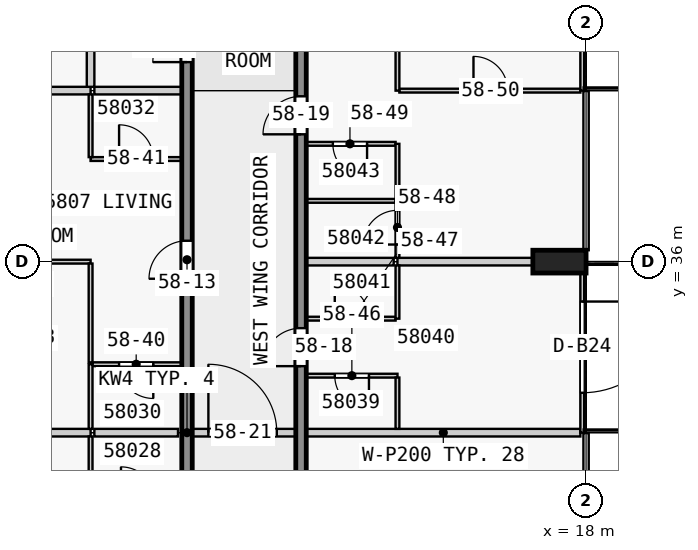
"""IFC4 building model, lengths in metres.
Left out: names, types, materials, properties, quantities, classifications, styles, units other than length and angle.
Written with IfcOpenShell. Run it as: python <this file> out.ifc"""

import sys

from ifc_helpers import new_model, si_unit, direction, frame, frame_2d, origin, origin_2d, place, context, subcontext, project, spatial, rectangle, extrude, element, fill, save


model = new_model("IFC4")
c1 = context("Model", 3, precision=1e-05, world=origin(), true_north=direction((0.0, 1.0)))
c2 = subcontext(c1, "Body", "Model", "MODEL_VIEW")
j1 = project(units=[si_unit("LENGTHUNIT", "METRE"), si_unit("PLANEANGLEUNIT", "RADIAN")], contexts=[c1])
p1 = place(None, origin())
s1 = spatial("IfcSite", under=j1, at=p1, CompositionType="ELEMENT")
p2 = place(p1, origin())
s2 = spatial("IfcBuilding", under=s1, at=p2, CompositionType="ELEMENT")
p3 = place(p2, frame((0.0, 0.0, 222.4)))
s3 = spatial("IfcBuildingStorey", under=s2, at=p3, CompositionType="ELEMENT", Elevation=222.4)
p4 = place(p3, frame((17.3, 36.0, 0.0), z_axis=(0.0, 0.0, 1.0), x_axis=(0.0, 1.0, 0.0)))
e1 = element("IfcColumn", 1, at=p4, inside=s3, PredefinedType="COLUMN", context=c2, shape_type="SweptSolid", body=[
    extrude(rectangle(XDim=0.6, YDim=1.4, at=origin_2d()), origin(), (0.0, 0.0, 1.0), 3.5),
])
p5 = place(p3, frame((7.5, 18.0, 0.0), z_axis=(0.0, 0.0, 1.0), x_axis=(0.0, 1.0, 0.0)))
e2 = element("IfcWall", 2, at=p5, inside=s3, PredefinedType="SHEAR", context=c2, shape_type="SweptSolid", body=[
    extrude(rectangle(XDim=27.0, YDim=0.275, at=frame_2d((13.5, 0.0))), origin(), (0.0, 0.0, 1.0), 3.25),
])
p6 = place(p5, frame((1.75, 0.0, 0.0)))
e3 = element("IfcOpeningElement", 3, at=p6, cuts=e2, PredefinedType="OPENING", context=c2, shape_type="SweptSolid", body=[
    extrude(rectangle(XDim=1.0, YDim=2.1, at=frame_2d((0.5, 1.05))), frame((0.0, 0.147, 0.0), z_axis=(0.0, -1.0, 0.0), x_axis=(1.0, 0.0, 0.0)), (0.0, 0.0, 1.0), 0.295),
])
p7 = place(p5, frame((8.55, 0.0, 0.0)))
e4 = element("IfcOpeningElement", 4, at=p7, cuts=e2, PredefinedType="OPENING", context=c2, shape_type="SweptSolid", body=[
    extrude(rectangle(XDim=1.0, YDim=2.1, at=frame_2d((0.5, 1.05))), frame((0.0, 0.147, 0.0), z_axis=(0.0, -1.0, 0.0), x_axis=(1.0, 0.0, 0.0)), (0.0, 0.0, 1.0), 0.295),
])
p8 = place(p5, frame((17.55, 0.0, 0.0)))
e5 = element("IfcOpeningElement", 5, at=p8, cuts=e2, PredefinedType="OPENING", context=c2, shape_type="SweptSolid", body=[
    extrude(rectangle(XDim=1.0, YDim=2.1, at=frame_2d((0.5, 1.05))), frame((0.0, 0.147, 0.0), z_axis=(0.0, -1.0, 0.0), x_axis=(1.0, 0.0, 0.0)), (0.0, 0.0, 1.0), 0.295),
])
p9 = place(p5, frame((23.25, 0.0, 0.0)))
e6 = element("IfcOpeningElement", 6, at=p9, cuts=e2, PredefinedType="OPENING", context=c2, shape_type="SweptSolid", body=[
    extrude(rectangle(XDim=0.9, YDim=2.1, at=frame_2d((0.45, 1.05))), frame((0.0, 0.147, 0.0), z_axis=(0.0, -1.0, 0.0), x_axis=(1.0, 0.0, 0.0)), (0.0, 0.0, 1.0), 0.295),
])
p10 = place(p5, frame((25.45, 0.0, 0.0)))
e7 = element("IfcOpeningElement", 7, at=p10, cuts=e2, PredefinedType="OPENING", context=c2, shape_type="SweptSolid", body=[
    extrude(rectangle(XDim=1.0, YDim=2.1, at=frame_2d((0.5, 1.05))), frame((0.0, 0.147, 0.0), z_axis=(0.0, -1.0, 0.0), x_axis=(1.0, 0.0, 0.0)), (0.0, 0.0, 1.0), 0.295),
])
p11 = place(p3, frame((10.5, 18.0, 0.0), z_axis=(0.0, 0.0, 1.0), x_axis=(0.0, 1.0, 0.0)))
e8 = element("IfcWall", 8, at=p11, inside=s3, PredefinedType="SHEAR", context=c2, shape_type="SweptSolid", body=[
    extrude(rectangle(XDim=27.0, YDim=0.275, at=frame_2d((13.5, 0.0))), origin(), (0.0, 0.0, 1.0), 3.25),
])
p12 = place(p11, frame((4.05, 0.0, 0.0)))
e9 = element("IfcOpeningElement", 9, at=p12, cuts=e8, PredefinedType="OPENING", context=c2, shape_type="SweptSolid", body=[
    extrude(rectangle(XDim=1.0, YDim=2.1, at=frame_2d((0.5, 1.05))), frame((0.0, 0.147, 0.0), z_axis=(0.0, -1.0, 0.0), x_axis=(1.0, 0.0, 0.0)), (0.0, 0.0, 1.0), 0.295),
])
p13 = place(p11, frame((10.35, 0.0, 0.0)))
e10 = element("IfcOpeningElement", 10, at=p13, cuts=e8, PredefinedType="OPENING", context=c2, shape_type="SweptSolid", body=[
    extrude(rectangle(XDim=1.8, YDim=2.1, at=frame_2d((0.9, 1.05))), frame((0.0, 0.147, 0.0), z_axis=(0.0, -1.0, 0.0), x_axis=(1.0, 0.0, 0.0)), (0.0, 0.0, 1.0), 0.295),
])
p14 = place(p11, frame((15.25, 0.0, 0.0)))
e11 = element("IfcOpeningElement", 11, at=p14, cuts=e8, PredefinedType="OPENING", context=c2, shape_type="SweptSolid", body=[
    extrude(rectangle(XDim=1.0, YDim=2.1, at=frame_2d((0.5, 1.05))), frame((0.0, 0.147, 0.0), z_axis=(0.0, -1.0, 0.0), x_axis=(1.0, 0.0, 0.0)), (0.0, 0.0, 1.0), 0.295),
])
p15 = place(p11, frame((21.35, 0.0, 0.0)))
e12 = element("IfcOpeningElement", 12, at=p15, cuts=e8, PredefinedType="OPENING", context=c2, shape_type="SweptSolid", body=[
    extrude(rectangle(XDim=1.0, YDim=2.1, at=frame_2d((0.5, 1.05))), frame((0.0, 0.147, 0.0), z_axis=(0.0, -1.0, 0.0), x_axis=(1.0, 0.0, 0.0)), (0.0, 0.0, 1.0), 0.295),
])
p16 = place(p3, frame((17.9, 36.0, 0.0), z_axis=(0.0, 0.0, 1.0), x_axis=(0.0, -1.0, 0.0)))
e13 = element("IfcWall", 13, at=p16, inside=s3, PredefinedType="STANDARD", context=c2, shape_type="SweptSolid", body=[
    extrude(rectangle(XDim=4.5, YDim=0.1, at=frame_2d((2.25, 0.0))), origin(), (0.0, 0.0, 1.0), 3.25),
])
p17 = place(p16, frame((1.05, 0.0, 0.0)))
e14 = element("IfcOpeningElement", 14, at=p17, cuts=e13, PredefinedType="OPENING", context=c2, shape_type="SweptSolid", body=[
    extrude(rectangle(XDim=2.4, YDim=2.4, at=frame_2d((1.2, 1.2))), frame((0.0, 0.06, 0.0), z_axis=(0.0, -1.0, 0.0), x_axis=(1.0, 0.0, 0.0)), (0.0, 0.0, 1.0), 0.12),
])
p18 = place(p3, frame((17.9, 45.0, 0.0), z_axis=(0.0, 0.0, 1.0), x_axis=(0.0, -1.0, 0.0)))
e15 = element("IfcWall", 15, at=p18, inside=s3, PredefinedType="STANDARD", context=c2, shape_type="SweptSolid", body=[
    extrude(rectangle(XDim=4.5, YDim=0.1, at=frame_2d((2.25, 0.0))), origin(), (0.0, 0.0, 1.0), 3.25),
])
p19 = place(p18, frame((1.05, 0.0, 0.0)))
e16 = element("IfcOpeningElement", 16, at=p19, cuts=e15, PredefinedType="OPENING", context=c2, shape_type="SweptSolid", body=[
    extrude(rectangle(XDim=2.4, YDim=2.4, at=frame_2d((1.2, 1.2))), frame((0.0, 0.06, 0.0), z_axis=(0.0, -1.0, 0.0), x_axis=(1.0, 0.0, 0.0)), (0.0, 0.0, 1.0), 0.12),
])
p20 = place(p3, frame((7.262, 31.5, 0.0), z_axis=(0.0, 0.0, 1.0), x_axis=(-1.0, 0.0, 0.0)))
e17 = element("IfcWall", 17, at=p20, inside=s3, PredefinedType="PARTITIONING", context=c2, shape_type="SweptSolid", body=[
    extrude(rectangle(XDim=2.2, YDim=0.2, at=frame_2d((1.1, 0.0))), origin(), (0.0, 0.0, 1.0), 3.25),
])
p21 = place(p3, frame((17.85, 31.5, 0.0), z_axis=(0.0, 0.0, 1.0), x_axis=(-1.0, 0.0, 0.0)))
e18 = element("IfcWall", 18, at=p21, inside=s3, PredefinedType="PARTITIONING", context=c2, shape_type="SweptSolid", body=[
    extrude(rectangle(XDim=7.213, YDim=0.2, at=frame_2d((3.606, 0.0))), origin(), (0.0, 0.0, 1.0), 3.25),
])
p22 = place(p3, frame((0.15, 31.5, 0.0), z_axis=(0.0, 0.0, 1.0), x_axis=(1.0, 0.0, 0.0)))
e19 = element("IfcWall", 19, at=p22, inside=s3, PredefinedType="PARTITIONING", context=c2, shape_type="SweptSolid", body=[
    extrude(rectangle(XDim=4.812, YDim=0.2, at=frame_2d((2.406, 0.0))), origin(), (0.0, 0.0, 1.0), 3.25),
])
p23 = place(p3, frame((13.038, 33.0, 0.0), z_axis=(0.0, 0.0, 1.0), x_axis=(-1.0, 0.0, 0.0)))
e20 = element("IfcWall", 20, at=p23, inside=s3, PredefinedType="PARTITIONING", context=c2, shape_type="SweptSolid", body=[
    extrude(rectangle(XDim=2.4, YDim=0.1, at=frame_2d((1.2, 0.0))), origin(), (0.0, 0.0, 1.0), 3.25),
])
p24 = place(p23, frame((0.75, 0.0, 0.0)))
e21 = element("IfcOpeningElement", 21, at=p24, cuts=e20, PredefinedType="OPENING", context=c2, shape_type="SweptSolid", body=[
    extrude(rectangle(XDim=0.9, YDim=2.1, at=frame_2d((0.45, 1.05))), frame((0.0, 0.06, 0.0), z_axis=(0.0, -1.0, 0.0), x_axis=(1.0, 0.0, 0.0)), (0.0, 0.0, 1.0), 0.12),
])
p25 = place(p3, frame((7.363, 33.3, 0.0), z_axis=(0.0, 0.0, 1.0), x_axis=(-1.0, 0.0, 0.0)))
e22 = element("IfcWall", 22, at=p25, inside=s3, PredefinedType="PARTITIONING", context=c2, shape_type="SweptSolid", body=[
    extrude(rectangle(XDim=2.35, YDim=0.1, at=frame_2d((1.175, 0.0))), origin(), (0.0, 0.0, 1.0), 3.25),
])
p26 = place(p25, frame((0.75, 0.0, 0.0)))
e23 = element("IfcOpeningElement", 23, at=p26, cuts=e22, PredefinedType="OPENING", context=c2, shape_type="SweptSolid", body=[
    extrude(rectangle(XDim=0.9, YDim=2.1, at=frame_2d((0.45, 1.05))), frame((0.0, 0.06, 0.0), z_axis=(0.0, -1.0, 0.0), x_axis=(1.0, 0.0, 0.0)), (0.0, 0.0, 1.0), 0.12),
])
p27 = place(p3, frame((10.637, 34.5, 0.0), z_axis=(0.0, 0.0, 1.0), x_axis=(1.0, 0.0, 0.0)))
e24 = element("IfcWall", 24, at=p27, inside=s3, PredefinedType="PARTITIONING", context=c2, shape_type="SweptSolid", body=[
    extrude(rectangle(XDim=2.35, YDim=0.1, at=frame_2d((1.175, 0.0))), origin(), (0.0, 0.0, 1.0), 3.25),
])
p28 = place(p27, frame((0.75, 0.0, 0.0)))
e25 = element("IfcOpeningElement", 25, at=p28, cuts=e24, PredefinedType="OPENING", context=c2, shape_type="SweptSolid", body=[
    extrude(rectangle(XDim=0.9, YDim=2.1, at=frame_2d((0.45, 1.05))), frame((0.0, 0.06, 0.0), z_axis=(0.0, -1.0, 0.0), x_axis=(1.0, 0.0, 0.0)), (0.0, 0.0, 1.0), 0.12),
])
p29 = place(p3, frame((4.962, 36.0, 0.0), z_axis=(0.0, 0.0, 1.0), x_axis=(-1.0, 0.0, 0.0)))
e26 = element("IfcWall", 26, at=p29, inside=s3, PredefinedType="PARTITIONING", context=c2, shape_type="SweptSolid", body=[
    extrude(rectangle(XDim=3.562, YDim=0.1, at=frame_2d((1.781, 0.0))), origin(), (0.0, 0.0, 1.0), 3.25),
])
p30 = place(p29, frame((1.35, 0.0, 0.0)))
e27 = element("IfcOpeningElement", 27, at=p30, cuts=e26, PredefinedType="OPENING", context=c2, shape_type="SweptSolid", body=[
    extrude(rectangle(XDim=0.9, YDim=2.1, at=frame_2d((0.45, 1.05))), frame((0.0, 0.06, 0.0), z_axis=(0.0, -1.0, 0.0), x_axis=(1.0, 0.0, 0.0)), (0.0, 0.0, 1.0), 0.12),
])
p31 = place(p3, frame((12.938, 36.0, 0.0), z_axis=(0.0, 0.0, 1.0), x_axis=(-1.0, 0.0, 0.0)))
e28 = element("IfcWall", 28, at=p31, inside=s3, PredefinedType="PARTITIONING", context=c2, shape_type="SweptSolid", body=[
    extrude(rectangle(XDim=2.3, YDim=0.2, at=frame_2d((1.15, 0.0))), origin(), (0.0, 0.0, 1.0), 3.25),
])
p32 = place(p3, frame((13.038, 36.0, 0.0), z_axis=(0.0, 0.0, 1.0), x_axis=(1.0, 0.0, 0.0)))
e29 = element("IfcWall", 29, at=p32, inside=s3, PredefinedType="PARTITIONING", context=c2, shape_type="SweptSolid", body=[
    extrude(rectangle(XDim=3.562, YDim=0.2, at=frame_2d((1.781, 0.0))), origin(), (0.0, 0.0, 1.0), 3.25),
])
p33 = place(p3, frame((12.988, 37.6, 0.0), z_axis=(0.0, 0.0, 1.0), x_axis=(-1.0, 0.0, 0.0)))
e30 = element("IfcWall", 30, at=p33, inside=s3, PredefinedType="PARTITIONING", context=c2, shape_type="SweptSolid", body=[
    extrude(rectangle(XDim=2.35, YDim=0.1, at=frame_2d((1.175, 0.0))), origin(), (0.0, 0.0, 1.0), 3.25),
])
p34 = place(p3, frame((4.962, 38.7, 0.0), z_axis=(0.0, 0.0, 1.0), x_axis=(1.0, 0.0, 0.0)))
e31 = element("IfcWall", 31, at=p34, inside=s3, PredefinedType="PARTITIONING", context=c2, shape_type="SweptSolid", body=[
    extrude(rectangle(XDim=2.4, YDim=0.1, at=frame_2d((1.2, 0.0))), origin(), (0.0, 0.0, 1.0), 3.25),
])
p35 = place(p34, frame((0.75, 0.0, 0.0)))
e32 = element("IfcOpeningElement", 32, at=p35, cuts=e31, PredefinedType="OPENING", context=c2, shape_type="SweptSolid", body=[
    extrude(rectangle(XDim=0.9, YDim=2.1, at=frame_2d((0.45, 1.05))), frame((0.0, 0.06, 0.0), z_axis=(0.0, -1.0, 0.0), x_axis=(1.0, 0.0, 0.0)), (0.0, 0.0, 1.0), 0.12),
])
p36 = place(p3, frame((12.988, 39.1, 0.0), z_axis=(0.0, 0.0, 1.0), x_axis=(-1.0, 0.0, 0.0)))
e33 = element("IfcWall", 33, at=p36, inside=s3, PredefinedType="PARTITIONING", context=c2, shape_type="SweptSolid", body=[
    extrude(rectangle(XDim=2.35, YDim=0.1, at=frame_2d((1.175, 0.0))), origin(), (0.0, 0.0, 1.0), 3.25),
])
p37 = place(p36, frame((0.75, 0.0, 0.0)))
e34 = element("IfcOpeningElement", 34, at=p37, cuts=e33, PredefinedType="OPENING", context=c2, shape_type="SweptSolid", body=[
    extrude(rectangle(XDim=0.9, YDim=2.1, at=frame_2d((0.45, 1.05))), frame((0.0, 0.06, 0.0), z_axis=(0.0, -1.0, 0.0), x_axis=(1.0, 0.0, 0.0)), (0.0, 0.0, 1.0), 0.12),
])
p38 = place(p3, frame((13.087, 40.5, 0.0), z_axis=(0.0, 0.0, 1.0), x_axis=(1.0, 0.0, 0.0)))
e35 = element("IfcWall", 35, at=p38, inside=s3, PredefinedType="PARTITIONING", context=c2, shape_type="SweptSolid", body=[
    extrude(rectangle(XDim=4.763, YDim=0.1, at=frame_2d((2.381, 0.0))), origin(), (0.0, 0.0, 1.0), 3.25),
])
p39 = place(p38, frame((1.95, 0.0, 0.0)))
e36 = element("IfcOpeningElement", 36, at=p39, cuts=e35, PredefinedType="OPENING", context=c2, shape_type="SweptSolid", body=[
    extrude(rectangle(XDim=0.9, YDim=2.1, at=frame_2d((0.45, 1.05))), frame((0.0, 0.06, 0.0), z_axis=(0.0, -1.0, 0.0), x_axis=(1.0, 0.0, 0.0)), (0.0, 0.0, 1.0), 0.12),
])
p40 = place(p3, frame((7.363, 40.5, 0.0), z_axis=(0.0, 0.0, 1.0), x_axis=(-1.0, 0.0, 0.0)))
e37 = element("IfcWall", 37, at=p40, inside=s3, PredefinedType="PARTITIONING", context=c2, shape_type="SweptSolid", body=[
    extrude(rectangle(XDim=2.3, YDim=0.2, at=frame_2d((1.15, 0.0))), origin(), (0.0, 0.0, 1.0), 3.25),
])
p41 = place(p3, frame((-0.08, 40.5, 0.0), z_axis=(0.0, 0.0, 1.0), x_axis=(1.0, 0.0, 0.0)))
e38 = element("IfcWall", 38, at=p41, inside=s3, PredefinedType="PARTITIONING", context=c2, shape_type="SweptSolid", body=[
    extrude(rectangle(XDim=5.042, YDim=0.2, at=frame_2d((2.521, 0.0))), origin(), (0.0, 0.0, 1.0), 3.25),
])
for number, where, z_axis, x_axis in (
    (39, (4.962, 31.4, 0.0), (0.0, 0.0, 1.0), (0.0, -1.0, 0.0)),
    (40, (4.962, 33.3, 0.0), (0.0, 0.0, 1.0), (0.0, -1.0, 0.0)),
):
    element("IfcWall", number, at=place(p3, frame(where, z_axis=z_axis, x_axis=x_axis)), inside=s3, PredefinedType="PARTITIONING", context=c2, shape_type="SweptSolid", body=[
        extrude(rectangle(XDim=1.7, YDim=0.1, at=frame_2d((0.85, 0.0))), origin(), (0.0, 0.0, 1.0), 3.25),
    ])
p42 = place(p3, frame((4.962, 40.4, 0.0), z_axis=(0.0, 0.0, 1.0), x_axis=(0.0, -1.0, 0.0)))
e41 = element("IfcWall", 41, at=p42, inside=s3, PredefinedType="PARTITIONING", context=c2, shape_type="SweptSolid", body=[
    extrude(rectangle(XDim=1.65, YDim=0.1, at=frame_2d((0.825, 0.0))), origin(), (0.0, 0.0, 1.0), 3.25),
])
p43 = place(p3, frame((4.962, 33.35, 0.0), z_axis=(0.0, 0.0, 1.0), x_axis=(0.0, 1.0, 0.0)))
e42 = element("IfcWall", 42, at=p43, inside=s3, PredefinedType="PARTITIONING", context=c2, shape_type="SweptSolid", body=[
    extrude(rectangle(XDim=2.6, YDim=0.1, at=frame_2d((1.3, 0.0))), origin(), (0.0, 0.0, 1.0), 3.25),
])
p44 = place(p3, frame((4.962, 42.8, 0.0), z_axis=(0.0, 0.0, 1.0), x_axis=(0.0, -1.0, 0.0)))
e43 = element("IfcWall", 43, at=p44, inside=s3, PredefinedType="PARTITIONING", context=c2, shape_type="SweptSolid", body=[
    extrude(rectangle(XDim=2.2, YDim=0.2, at=frame_2d((1.1, 0.0))), origin(), (0.0, 0.0, 1.0), 3.25),
])
p45 = place(p3, frame((13.038, 54.08, 0.0), z_axis=(0.0, 0.0, 1.0), x_axis=(0.0, -1.0, 0.0)))
e44 = element("IfcWall", 44, at=p45, inside=s3, PredefinedType="PARTITIONING", context=c2, shape_type="SweptSolid", body=[
    extrude(rectangle(XDim=13.58, YDim=0.1, at=frame_2d((6.79, 0.0))), origin(), (0.0, 0.0, 1.0), 3.25),
])
p46 = place(p45, frame((6.45, 0.0, 0.0)))
e45 = element("IfcOpeningElement", 45, at=p46, cuts=e44, PredefinedType="OPENING", context=c2, shape_type="SweptSolid", body=[
    extrude(rectangle(XDim=0.9, YDim=2.1, at=frame_2d((0.45, 1.05))), frame((0.0, 0.06, 0.0), z_axis=(0.0, -1.0, 0.0), x_axis=(1.0, 0.0, 0.0)), (0.0, 0.0, 1.0), 0.12),
])
p47 = place(p45, frame((1.95, 0.0, 0.0)))
e46 = element("IfcOpeningElement", 46, at=p47, cuts=e44, PredefinedType="OPENING", context=c2, shape_type="SweptSolid", body=[
    extrude(rectangle(XDim=0.9, YDim=2.1, at=frame_2d((0.45, 1.05))), frame((0.0, 0.06, 0.0), z_axis=(0.0, -1.0, 0.0), x_axis=(1.0, 0.0, 0.0)), (0.0, 0.0, 1.0), 0.12),
])
p48 = place(p3, frame((13.038, 31.6, 0.0), z_axis=(0.0, 0.0, 1.0), x_axis=(0.0, 1.0, 0.0)))
e47 = element("IfcWall", 47, at=p48, inside=s3, PredefinedType="PARTITIONING", context=c2, shape_type="SweptSolid", body=[
    extrude(rectangle(XDim=1.35, YDim=0.1, at=frame_2d((0.675, 0.0))), origin(), (0.0, 0.0, 1.0), 3.25),
])
p49 = place(p3, frame((13.038, 34.5, 0.0), z_axis=(0.0, 0.0, 1.0), x_axis=(0.0, 1.0, 0.0)))
e48 = element("IfcWall", 48, at=p49, inside=s3, PredefinedType="PARTITIONING", context=c2, shape_type="SweptSolid", body=[
    extrude(rectangle(XDim=1.4, YDim=0.1, at=frame_2d((0.7, 0.0))), origin(), (0.0, 0.0, 1.0), 3.25),
])
p50 = place(p3, frame((13.038, 36.1, 0.0), z_axis=(0.0, 0.0, 1.0), x_axis=(0.0, 1.0, 0.0)))
e49 = element("IfcWall", 49, at=p50, inside=s3, PredefinedType="PARTITIONING", context=c2, shape_type="SweptSolid", body=[
    extrude(rectangle(XDim=3.0, YDim=0.1, at=frame_2d((1.5, 0.0))), origin(), (0.0, 0.0, 1.0), 3.25),
])
p51 = place(p50, frame((0.35, 0.0, 0.0)))
e50 = element("IfcOpeningElement", 50, at=p51, cuts=e49, PredefinedType="OPENING", context=c2, shape_type="SweptSolid", body=[
    extrude(rectangle(XDim=0.9, YDim=2.1, at=frame_2d((0.45, 1.05))), frame((0.0, 0.06, 0.0), z_axis=(0.0, -1.0, 0.0), x_axis=(1.0, 0.0, 0.0)), (0.0, 0.0, 1.0), 0.12),
])
p52 = place(p3, frame((7.363, 31.5, 0.0), z_axis=(0.0, 0.0, 1.0), x_axis=(1.0, 0.0, 0.0)))
e51 = element("IfcWall", 51, at=p52, inside=s3, PredefinedType="PARTITIONING", context=c2, shape_type="SweptSolid", body=[
    extrude(rectangle(XDim=3.175, YDim=0.2, at=frame_2d((1.587, 0.0))), origin(), (0.0, 0.0, 1.0), 3.25),
])
p53 = place(p52, frame((0.7, 0.0, 0.0)))
e52 = element("IfcOpeningElement", 52, at=p53, cuts=e51, PredefinedType="OPENING", context=c2, shape_type="SweptSolid", body=[
    extrude(rectangle(XDim=1.8, YDim=2.1, at=frame_2d((0.9, 1.05))), frame((0.0, 0.11, 0.0), z_axis=(0.0, -1.0, 0.0), x_axis=(1.0, 0.0, 0.0)), (0.0, 0.0, 1.0), 0.22),
])
p54 = place(p17, origin())
e53 = element("IfcDoor", 53, at=p54, inside=s3, OperationType="SINGLE_SWING_LEFT", PredefinedType="DOOR", context=c2, shape_type="SweptSolid", body=[
    extrude(rectangle(XDim=2.4, YDim=2.4, at=frame_2d((1.2, 1.2))), frame((0.0, 0.025, 0.0), z_axis=(0.0, -1.0, 0.0), x_axis=(1.0, 0.0, 0.0)), (0.0, 0.0, 1.0), 0.05),
])
fill(e14, e53)
p55 = place(p8, origin())
e54 = element("IfcDoor", 54, at=p55, inside=s3, OperationType="SINGLE_SWING_RIGHT", PredefinedType="DOOR", context=c2, shape_type="SweptSolid", body=[
    extrude(rectangle(XDim=1.0, YDim=2.1, at=frame_2d((0.5, 1.05))), frame((0.0, 0.025, 0.0), z_axis=(0.0, -1.0, 0.0), x_axis=(1.0, 0.0, 0.0)), (0.0, 0.0, 1.0), 0.05),
])
fill(e5, e54)
p56 = place(p9, origin())
e55 = element("IfcDoor", 55, at=p56, inside=s3, OperationType="SINGLE_SWING_RIGHT", PredefinedType="DOOR", context=c2, shape_type="SweptSolid", body=[
    extrude(rectangle(XDim=0.9, YDim=2.1, at=frame_2d((0.45, 1.05))), frame((0.0, 0.025, 0.0), z_axis=(0.0, -1.0, 0.0), x_axis=(1.0, 0.0, 0.0)), (0.0, 0.0, 1.0), 0.05),
])
fill(e6, e55)
p57 = place(p14, origin())
e56 = element("IfcDoor", 56, at=p57, inside=s3, OperationType="SINGLE_SWING_RIGHT", PredefinedType="DOOR", context=c2, shape_type="SweptSolid", body=[
    extrude(rectangle(XDim=1.0, YDim=2.1, at=frame_2d((0.5, 1.05))), frame((0.0, 0.025, 0.0), z_axis=(0.0, -1.0, 0.0), x_axis=(1.0, 0.0, 0.0)), (0.0, 0.0, 1.0), 0.05),
])
fill(e11, e56)
p58 = place(p15, origin())
e57 = element("IfcDoor", 57, at=p58, inside=s3, OperationType="SINGLE_SWING_RIGHT", PredefinedType="DOOR", context=c2, shape_type="SweptSolid", body=[
    extrude(rectangle(XDim=1.0, YDim=2.1, at=frame_2d((0.5, 1.05))), frame((0.0, 0.025, 0.0), z_axis=(0.0, -1.0, 0.0), x_axis=(1.0, 0.0, 0.0)), (0.0, 0.0, 1.0), 0.05),
])
fill(e12, e57)
p59 = place(p53, origin())
e58 = element("IfcDoor", 58, at=p59, inside=s3, OperationType="SINGLE_SWING_RIGHT", PredefinedType="DOOR", context=c2, shape_type="SweptSolid", body=[
    extrude(rectangle(XDim=1.8, YDim=2.1, at=frame_2d((0.9, 1.05))), frame((0.0, 0.025, 0.0), z_axis=(0.0, -1.0, 0.0), x_axis=(1.0, 0.0, 0.0)), (0.0, 0.0, 1.0), 0.05),
])
fill(e52, e58)
p60 = place(p26, origin())
e59 = element("IfcDoor", 59, at=p60, inside=s3, OperationType="SINGLE_SWING_RIGHT", PredefinedType="DOOR", context=c2, shape_type="SweptSolid", body=[
    extrude(rectangle(XDim=0.9, YDim=2.1, at=frame_2d((0.45, 1.05))), frame((0.0, 0.025, 0.0), z_axis=(0.0, -1.0, 0.0), x_axis=(1.0, 0.0, 0.0)), (0.0, 0.0, 1.0), 0.05),
])
fill(e23, e59)
p61 = place(p35, origin())
e60 = element("IfcDoor", 60, at=p61, inside=s3, OperationType="SINGLE_SWING_RIGHT", PredefinedType="DOOR", context=c2, shape_type="SweptSolid", body=[
    extrude(rectangle(XDim=0.9, YDim=2.1, at=frame_2d((0.45, 1.05))), frame((0.0, 0.025, 0.0), z_axis=(0.0, -1.0, 0.0), x_axis=(1.0, 0.0, 0.0)), (0.0, 0.0, 1.0), 0.05),
])
fill(e32, e60)
p62 = place(p24, origin())
e61 = element("IfcDoor", 61, at=p62, inside=s3, OperationType="SINGLE_SWING_LEFT", PredefinedType="DOOR", context=c2, shape_type="SweptSolid", body=[
    extrude(rectangle(XDim=0.9, YDim=2.1, at=frame_2d((0.45, 1.05))), frame((0.0, 0.025, 0.0), z_axis=(0.0, -1.0, 0.0), x_axis=(1.0, 0.0, 0.0)), (0.0, 0.0, 1.0), 0.05),
])
fill(e21, e61)
p63 = place(p28, origin())
e62 = element("IfcDoor", 62, at=p63, inside=s3, OperationType="SINGLE_SWING_RIGHT", PredefinedType="DOOR", context=c2, shape_type="SweptSolid", body=[
    extrude(rectangle(XDim=0.9, YDim=2.1, at=frame_2d((0.45, 1.05))), frame((0.0, 0.025, 0.0), z_axis=(0.0, -1.0, 0.0), x_axis=(1.0, 0.0, 0.0)), (0.0, 0.0, 1.0), 0.05),
])
fill(e25, e62)
p64 = place(p51, origin())
e63 = element("IfcDoor", 63, at=p64, inside=s3, OperationType="SINGLE_SWING_LEFT", PredefinedType="DOOR", context=c2, shape_type="SweptSolid", body=[
    extrude(rectangle(XDim=0.9, YDim=2.1, at=frame_2d((0.45, 1.05))), frame((0.0, 0.025, 0.0), z_axis=(0.0, -1.0, 0.0), x_axis=(1.0, 0.0, 0.0)), (0.0, 0.0, 1.0), 0.05),
])
fill(e50, e63)
p65 = place(p37, origin())
e64 = element("IfcDoor", 64, at=p65, inside=s3, OperationType="SINGLE_SWING_RIGHT", PredefinedType="DOOR", context=c2, shape_type="SweptSolid", body=[
    extrude(rectangle(XDim=0.9, YDim=2.1, at=frame_2d((0.45, 1.05))), frame((0.0, 0.025, 0.0), z_axis=(0.0, -1.0, 0.0), x_axis=(1.0, 0.0, 0.0)), (0.0, 0.0, 1.0), 0.05),
])
fill(e34, e64)
p66 = place(p39, origin())
e65 = element("IfcDoor", 65, at=p66, inside=s3, OperationType="SINGLE_SWING_RIGHT", PredefinedType="DOOR", context=c2, shape_type="SweptSolid", body=[
    extrude(rectangle(XDim=0.9, YDim=2.1, at=frame_2d((0.45, 1.05))), frame((0.0, 0.025, 0.0), z_axis=(0.0, -1.0, 0.0), x_axis=(1.0, 0.0, 0.0)), (0.0, 0.0, 1.0), 0.05),
])
fill(e36, e65)
save(model, sys.argv[1])
